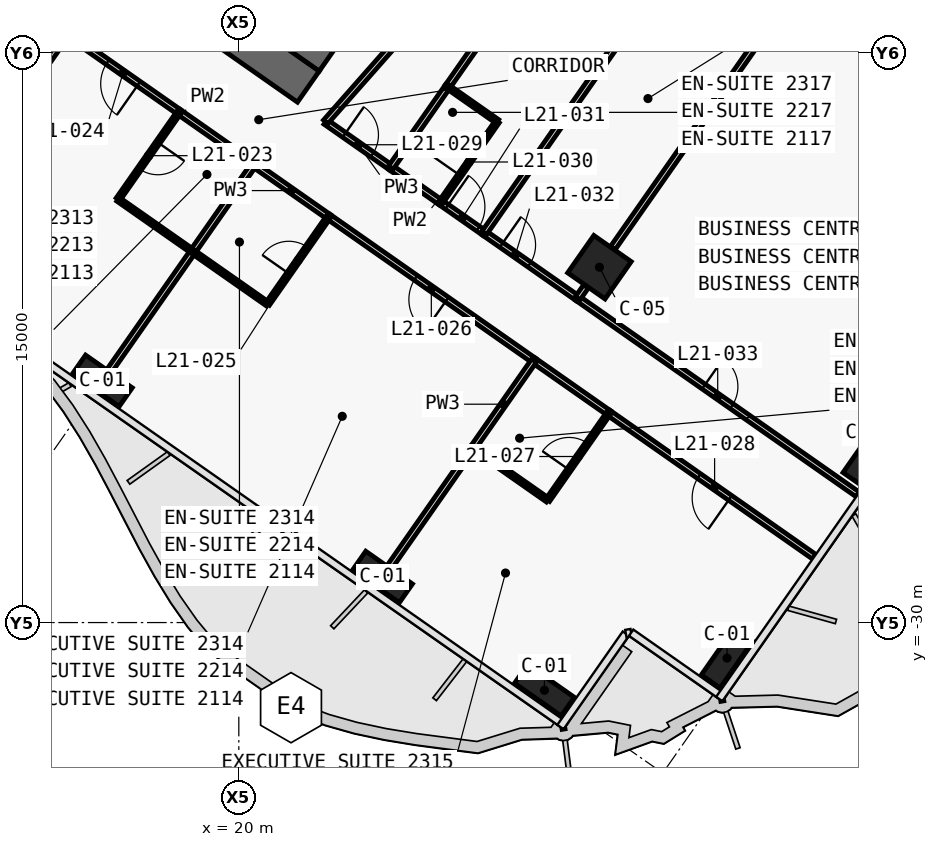
"""IFC4 building model, lengths in metres.
Left out: names, types, materials, properties, quantities, classifications, styles, units other than length and angle.
Written with IfcOpenShell. Run it as: python <this file> out.ifc"""

import sys

from ifc_helpers import new_model, si_unit, direction, frame, frame_2d, origin, origin_2d, place, context, subcontext, project, spatial, polyline, rectangle, outline, extrude, element, fill, save


model = new_model("IFC4")
c1 = context("Model", 3, precision=1e-05, world=origin(), true_north=direction((0.0, 1.0)))
c2 = subcontext(c1, "Body", "Model", "MODEL_VIEW")
j1 = project(units=[si_unit("LENGTHUNIT", "METRE"), si_unit("PLANEANGLEUNIT", "RADIAN")], contexts=[c1])
p1 = place(None, origin())
s1 = spatial("IfcSite", under=j1, at=p1, CompositionType="ELEMENT")
p2 = place(p1, origin())
s2 = spatial("IfcBuilding", under=s1, at=p2, CompositionType="ELEMENT")
p3 = place(p2, frame((0.0, 0.0, 101.3)))
s3 = spatial("IfcBuildingStorey", under=s2, at=p3, CompositionType="ELEMENT", Elevation=101.3)
p4 = place(p3, frame((-0.037, -0.585, 0.0), z_axis=(0.0, 0.0, 1.0), x_axis=(0.819157152511, -0.573569140985, 0.0)))
e1 = element("IfcWall", 1, at=p4, inside=s3, PredefinedType="SHEAR", context=c2, shape_type="SweptSolid", body=[
    extrude(outline(polyline([(26.695, 0.5), (0.0, 0.5), (0.7, -0.5), (26.695, -0.5), (26.695, 0.5)])), origin(), (0.0, 0.0, 1.0), 3.6),
])
p5 = place(p4, frame((1.045, 0.0, 0.0)))
e2 = element("IfcOpeningElement", 2, at=p5, cuts=e1, PredefinedType="OPENING", context=c2, shape_type="SweptSolid", body=[
    extrude(rectangle(XDim=1.5, YDim=2.1, at=frame_2d((0.75, 1.05))), frame((0.0, 0.51, 0.0), z_axis=(0.0, -1.0, 0.0), x_axis=(1.0, 0.0, 0.0)), (0.0, 0.0, 1.0), 1.02),
])
p6 = place(p4, frame((12.445, 0.0, 0.0)))
e3 = element("IfcOpeningElement", 3, at=p6, cuts=e1, PredefinedType="OPENING", context=c2, shape_type="SweptSolid", body=[
    extrude(rectangle(XDim=1.5, YDim=2.1, at=frame_2d((0.75, 1.05))), frame((0.0, 0.51, 0.0), z_axis=(0.0, -1.0, 0.0), x_axis=(1.0, 0.0, 0.0)), (0.0, 0.0, 1.0), 1.02),
])
p7 = place(p3, frame((21.708, -15.2, 0.0), z_axis=(0.0, 0.0, 1.0), x_axis=(0.573576324356, 0.819152122709, 0.0)))
e4 = element("IfcWall", 4, at=p7, inside=s3, PredefinedType="SHEAR", context=c2, shape_type="SweptSolid", body=[
    extrude(outline(polyline([(9.2, 0.5), (0.0, 0.5), (0.0, -0.5), (9.2, -0.5), (9.2, 0.5)])), origin(), (0.0, 0.0, 1.0), 3.6),
])
p8 = place(p7, frame((6.1, 0.0, 0.0)))
e5 = element("IfcOpeningElement", 5, at=p8, cuts=e4, PredefinedType="OPENING", context=c2, shape_type="SweptSolid", body=[
    extrude(rectangle(XDim=1.8, YDim=2.1, at=frame_2d((0.9, 1.05))), frame((0.0, 0.51, 0.0), z_axis=(0.0, -1.0, 0.0), x_axis=(1.0, 0.0, 0.0)), (0.0, 0.0, 1.0), 1.02),
])
p9 = place(p7, frame((1.9, 0.0, 0.0)))
e6 = element("IfcOpeningElement", 6, at=p9, cuts=e4, PredefinedType="OPENING", context=c2, shape_type="SweptSolid", body=[
    extrude(rectangle(XDim=1.8, YDim=2.1, at=frame_2d((0.9, 1.05))), frame((0.0, 0.51, 0.0), z_axis=(0.0, -1.0, 0.0), x_axis=(1.0, 0.0, 0.0)), (0.0, 0.0, 1.0), 1.02),
])
for number, where, z_axis, x_axis in (
    (7, (16.41, -23.637, 0.0), (0.0, 0.0, 1.0), (0.819, -0.574, 0.0)),
    (8, (23.782, -28.799, 0.0), (0.0, 0.0, 1.0), (0.819, -0.574, 0.0)),
    (9, (28.042, -31.782, 0.0), (0.0, 0.0, 1.0), (0.819, -0.574, 0.0)),
    (10, (32.847, -30.935, 0.0), (0.0, 0.0, 1.0), (0.574, 0.819, 0.0)),
    (11, (36.575, -25.61, 0.0), (0.0, 0.0, 1.0), (0.574, 0.819, 0.0)),
):
    element("IfcColumn", number, at=place(p3, frame(where, z_axis=z_axis, x_axis=x_axis)), inside=s3, PredefinedType="COLUMN", context=c2, shape_type="SweptSolid", body=[
        extrude(rectangle(XDim=1.5, YDim=0.6, at=origin_2d()), origin(), (0.0, 0.0, 1.0), 3.6),
    ])
p10 = place(p3, frame((29.49, -20.649, 0.0), z_axis=(0.0, 0.0, 1.0), x_axis=(0.819152044289, -0.573576436351, 0.0)))
e12 = element("IfcColumn", 12, at=p10, inside=s3, PredefinedType="COLUMN", context=c2, shape_type="SweptSolid", body=[
    extrude(rectangle(XDim=1.2, YDim=1.2, at=origin_2d()), origin(), (0.0, 0.0, 1.0), 3.6),
])
p11 = place(p3, frame((22.284, -16.824, 0.0), z_axis=(0.0, 0.0, 1.0), x_axis=(0.819160859995, -0.573563846013, 0.0)))
e13 = element("IfcWall", 13, at=p11, inside=s3, PredefinedType="PARTITIONING", context=c2, shape_type="SweptSolid", body=[
    extrude(rectangle(XDim=2.098, YDim=0.15, at=frame_2d((1.049, 0.0))), origin(), (0.0, 0.0, 1.0), 3.32),
])
p12 = place(p11, frame((0.599, 0.0, 0.0)))
e14 = element("IfcOpeningElement", 14, at=p12, cuts=e13, PredefinedType="OPENING", context=c2, shape_type="SweptSolid", body=[
    extrude(rectangle(XDim=0.9, YDim=2.1, at=frame_2d((0.45, 1.05))), frame((0.0, 0.085, 0.0), z_axis=(0.0, -1.0, 0.0), x_axis=(1.0, 0.0, 0.0)), (0.0, 0.0, 1.0), 0.17),
])
p13 = place(p3, frame((25.311, -18.944, 0.0), z_axis=(0.0, 0.0, 1.0), x_axis=(0.819199220913, -0.573509055252, 0.0)))
e15 = element("IfcWall", 15, at=p13, inside=s3, PredefinedType="PARTITIONING", context=c2, shape_type="SweptSolid", body=[
    extrude(rectangle(XDim=1.403, YDim=0.15, at=frame_2d((0.702, 0.0))), origin(), (0.0, 0.0, 1.0), 3.32),
])
p14 = place(p13, frame((0.201, 0.0, 0.0)))
e16 = element("IfcOpeningElement", 16, at=p14, cuts=e15, PredefinedType="OPENING", context=c2, shape_type="SweptSolid", body=[
    extrude(rectangle(XDim=1.0, YDim=2.1, at=frame_2d((0.5, 1.05))), frame((0.0, 0.085, 0.0), z_axis=(0.0, -1.0, 0.0), x_axis=(1.0, 0.0, 0.0)), (0.0, 0.0, 1.0), 0.17),
])
p15 = place(p3, frame((23.999, -18.025, 0.0), z_axis=(0.0, 0.0, 1.0), x_axis=(0.819189013667, -0.573523634986, 0.0)))
e17 = element("IfcWall", 17, at=p15, inside=s3, PredefinedType="PARTITIONING", context=c2, shape_type="SweptSolid", body=[
    extrude(rectangle(XDim=1.604, YDim=0.15, at=frame_2d((0.802, 0.0))), origin(), (0.0, 0.0, 1.0), 3.32),
])
p16 = place(p3, frame((26.457, -19.746, 0.0), z_axis=(0.0, 0.0, 1.0), x_axis=(0.81916700466, -0.573555070134, 0.0)))
e18 = element("IfcWall", 18, at=p16, inside=s3, PredefinedType="PARTITIONING", context=c2, shape_type="SweptSolid", body=[
    extrude(rectangle(XDim=3.004, YDim=0.15, at=frame_2d((1.502, 0.0))), origin(), (0.0, 0.0, 1.0), 2.6),
])
p17 = place(p16, frame((0.552, 0.0, 0.0)))
e19 = element("IfcOpeningElement", 19, at=p17, cuts=e18, PredefinedType="OPENING", context=c2, shape_type="SweptSolid", body=[
    extrude(rectangle(XDim=0.9, YDim=2.1, at=frame_2d((0.45, 1.05))), frame((0.0, 0.085, 0.0), z_axis=(0.0, -1.0, 0.0), x_axis=(1.0, 0.0, 0.0)), (0.0, 0.0, 1.0), 0.17),
])
p18 = place(p3, frame((28.914, -21.467, 0.0), z_axis=(0.0, 0.0, 1.0), x_axis=(0.81915291695, -0.57357519006, 0.0)))
e20 = element("IfcWall", 20, at=p18, inside=s3, PredefinedType="PARTITIONING", context=c2, shape_type="SweptSolid", body=[
    extrude(rectangle(XDim=9.002, YDim=0.15, at=frame_2d((4.501, 0.0))), origin(), (0.0, 0.0, 1.0), 2.5),
])
p19 = place(p18, frame((4.051, 0.0, 0.0)))
e21 = element("IfcOpeningElement", 21, at=p19, cuts=e20, PredefinedType="OPENING", context=c2, shape_type="SweptSolid", body=[
    extrude(rectangle(XDim=0.9, YDim=2.1, at=frame_2d((0.45, 1.05))), frame((0.0, 0.085, 0.0), z_axis=(0.0, -1.0, 0.0), x_axis=(1.0, 0.0, 0.0)), (0.0, 0.0, 1.0), 0.17),
])
p20 = place(p3, frame((18.431, -16.568, 0.0), z_axis=(0.0, 0.0, 1.0), x_axis=(-0.819145961204, 0.573585123798, 0.0)))
e22 = element("IfcWall", 22, at=p20, inside=s3, PredefinedType="PARTITIONING", context=c2, shape_type="SweptSolid", body=[
    extrude(rectangle(XDim=3.603, YDim=0.15, at=frame_2d((1.802, 0.0))), origin(), (0.0, 0.0, 1.0), 3.32),
])
p21 = place(p20, frame((1.301, 0.0, 0.0)))
e23 = element("IfcOpeningElement", 23, at=p21, cuts=e22, PredefinedType="OPENING", context=c2, shape_type="SweptSolid", body=[
    extrude(rectangle(XDim=1.0, YDim=2.1, at=frame_2d((0.5, 1.05))), frame((0.0, 0.085, 0.0), z_axis=(0.0, -1.0, 0.0), x_axis=(1.0, 0.0, 0.0)), (0.0, 0.0, 1.0), 0.17),
])
p22 = place(p3, frame((20.398, -17.945, 0.0), z_axis=(0.0, 0.0, 1.0), x_axis=(-0.819146032251, 0.573585022335, 0.0)))
e24 = element("IfcWall", 24, at=p22, inside=s3, PredefinedType="PARTITIONING", context=c2, shape_type="SweptSolid", body=[
    extrude(rectangle(XDim=2.404, YDim=0.15, at=frame_2d((1.202, 0.0))), origin(), (0.0, 0.0, 1.0), 2.6),
])
p23 = place(p3, frame((27.771, -23.107, 0.0), z_axis=(0.0, 0.0, 1.0), x_axis=(-0.819153746897, 0.573574004767, 0.0)))
e25 = element("IfcWall", 25, at=p23, inside=s3, PredefinedType="PARTITIONING", context=c2, shape_type="SweptSolid", body=[
    extrude(rectangle(XDim=6.603, YDim=0.15, at=frame_2d((3.302, 0.0))), origin(), (0.0, 0.0, 1.0), 2.6),
])
p24 = place(p23, frame((2.802, 0.0, 0.0)))
e26 = element("IfcOpeningElement", 26, at=p24, cuts=e25, PredefinedType="OPENING", context=c2, shape_type="SweptSolid", body=[
    extrude(rectangle(XDim=1.0, YDim=2.1, at=frame_2d((0.5, 1.05))), frame((0.0, 0.085, 0.0), z_axis=(0.0, -1.0, 0.0), x_axis=(1.0, 0.0, 0.0)), (0.0, 0.0, 1.0), 0.17),
])
p25 = place(p3, frame((22.364, -19.322, 0.0), z_axis=(0.0, 0.0, 1.0), x_axis=(-0.819146032251, 0.573585022335, 0.0)))
e27 = element("IfcWall", 27, at=p25, inside=s3, PredefinedType="PARTITIONING", context=c2, shape_type="SweptSolid", body=[
    extrude(rectangle(XDim=2.404, YDim=0.15, at=frame_2d((1.202, 0.0))), origin(), (0.0, 0.0, 1.0), 2.6),
])
p26 = place(p3, frame((35.141, -28.268, 0.0), z_axis=(0.0, 0.0, 1.0), x_axis=(-0.819155459934, 0.573571558274, 0.0)))
e28 = element("IfcWall", 28, at=p26, inside=s3, PredefinedType="PARTITIONING", context=c2, shape_type="SweptSolid", body=[
    extrude(rectangle(XDim=6.601, YDim=0.15, at=frame_2d((3.301, 0.0))), origin(), (0.0, 0.0, 1.0), 2.5),
])
p27 = place(p26, frame((2.7, 0.0, 0.0)))
e29 = element("IfcOpeningElement", 29, at=p27, cuts=e28, PredefinedType="OPENING", context=c2, shape_type="SweptSolid", body=[
    extrude(rectangle(XDim=1.0, YDim=2.1, at=frame_2d((0.5, 1.05))), frame((0.0, 0.085, 0.0), z_axis=(0.0, -1.0, 0.0), x_axis=(1.0, 0.0, 0.0)), (0.0, 0.0, 1.0), 0.17),
])
p28 = place(p3, frame((29.736, -24.484, 0.0), z_axis=(0.0, 0.0, 1.0), x_axis=(-0.819146032251, 0.573585022335, 0.0)))
e30 = element("IfcWall", 30, at=p28, inside=s3, PredefinedType="PARTITIONING", context=c2, shape_type="SweptSolid", body=[
    extrude(rectangle(XDim=2.404, YDim=0.15, at=frame_2d((1.202, 0.0))), origin(), (0.0, 0.0, 1.0), 2.6),
])
p29 = place(p3, frame((30.482, -8.77, 0.0), z_axis=(0.0, 0.0, 1.0), x_axis=(-0.573579093502, -0.819150183725, 0.0)))
e31 = element("IfcWall", 31, at=p29, inside=s3, PredefinedType="PARTITIONING", context=c2, shape_type="SweptSolid", body=[
    extrude(rectangle(XDim=8.701, YDim=0.15, at=frame_2d((4.351, 0.0))), origin(), (0.0, 0.0, 1.0), 2.6),
])
p30 = place(p3, frame((25.493, -15.895, 0.0), z_axis=(0.0, 0.0, 1.0), x_axis=(-0.573588285102, -0.819143747577, 0.0)))
e32 = element("IfcWall", 32, at=p30, inside=s3, PredefinedType="PARTITIONING", context=c2, shape_type="SweptSolid", body=[
    extrude(rectangle(XDim=2.602, YDim=0.15, at=frame_2d((1.301, 0.0))), origin(), (0.0, 0.0, 1.0), 2.6),
])
p31 = place(p3, frame((22.285, -16.825, 0.0), z_axis=(0.0, 0.0, 1.0), x_axis=(0.661551268245, 0.749899939647, 0.0)))
e33 = element("IfcWall", 33, at=p31, inside=s3, PredefinedType="PARTITIONING", context=c2, shape_type="SweptSolid", body=[
    extrude(rectangle(XDim=6.541, YDim=0.15, at=frame_2d((3.271, 0.0))), origin(), (0.0, 0.0, 1.0), 2.6),
])
p32 = place(p3, frame((25.312, -18.945, 0.0), z_axis=(0.0, 0.0, 1.0), x_axis=(0.573582085028, 0.819148089014, 0.0)))
e34 = element("IfcWall", 34, at=p32, inside=s3, PredefinedType="PARTITIONING", context=c2, shape_type="SweptSolid", body=[
    extrude(rectangle(XDim=2.6, YDim=0.12, at=frame_2d((1.3, 0.0))), origin(), (0.0, 0.0, 1.0), 2.6),
])
p33 = place(p32, frame((0.875, 0.0, 0.0)))
e35 = element("IfcOpeningElement", 35, at=p33, cuts=e34, PredefinedType="OPENING", context=c2, shape_type="SweptSolid", body=[
    extrude(rectangle(XDim=0.85, YDim=2.05, at=frame_2d((0.425, 1.025))), frame((0.0, 0.07, 0.0), z_axis=(0.0, -1.0, 0.0), x_axis=(1.0, 0.0, 0.0)), (0.0, 0.0, 1.0), 0.14),
])
p34 = place(p3, frame((26.803, -16.814, 0.0), z_axis=(0.0, 0.0, 1.0), x_axis=(-0.819059844958, 0.573708088123, 0.0)))
e36 = element("IfcWall", 36, at=p34, inside=s3, PredefinedType="PARTITIONING", context=c2, shape_type="SweptSolid", body=[
    extrude(rectangle(XDim=1.6, YDim=0.12, at=frame_2d((0.8, 0.0))), origin(), (0.0, 0.0, 1.0), 3.32),
])
p35 = place(p3, frame((32.94, -10.491, 0.0), z_axis=(0.0, 0.0, 1.0), x_axis=(-0.573571089604, -0.819155788095, 0.0)))
e37 = element("IfcWall", 37, at=p35, inside=s3, PredefinedType="PARTITIONING", context=c2, shape_type="SweptSolid", body=[
    extrude(rectangle(XDim=11.3, YDim=0.15, at=frame_2d((5.65, 0.0))), origin(), (0.0, 0.0, 1.0), 2.6),
])
p36 = place(p3, frame((35.013, -12.76, 0.0), z_axis=(0.0, 0.0, 1.0), x_axis=(-0.573558725113, -0.819164445546, 0.0)))
e38 = element("IfcWall", 38, at=p36, inside=s3, PredefinedType="PARTITIONING", context=c2, shape_type="SweptSolid", body=[
    extrude(rectangle(XDim=9.01, YDim=0.15, at=frame_2d((4.505, 0.0))), origin(), (0.0, 0.0, 1.0), 2.6),
])
p37 = place(p3, frame((29.134, -21.156, 0.0), z_axis=(0.0, 0.0, 1.0), x_axis=(-0.572944929411, -0.819593867633, 0.0)))
e39 = element("IfcWall", 39, at=p37, inside=s3, PredefinedType="PARTITIONING", context=c2, shape_type="SweptSolid", body=[
    extrude(rectangle(XDim=0.38, YDim=0.15, at=frame_2d((0.19, 0.0))), origin(), (0.0, 0.0, 1.0), 2.6),
])
p38 = place(p3, frame((15.481, -14.503, 0.0), z_axis=(0.0, 0.0, 1.0), x_axis=(-0.573572324301, -0.819154923562, 0.0)))
e40 = element("IfcWall", 40, at=p38, inside=s3, PredefinedType="PARTITIONING", context=c2, shape_type="SweptSolid", body=[
    extrude(rectangle(XDim=7.3, YDim=0.15, at=frame_2d((3.65, 0.0))), origin(), (0.0, 0.0, 1.0), 2.5),
])
p39 = place(p3, frame((18.43, -16.567, 0.0), z_axis=(0.0, 0.0, 1.0), x_axis=(-0.573608623498, -0.819129505664, 0.0)))
e41 = element("IfcWall", 41, at=p39, inside=s3, PredefinedType="PARTITIONING", context=c2, shape_type="SweptSolid", body=[
    extrude(rectangle(XDim=2.8, YDim=0.12, at=frame_2d((1.4, 0.0))), origin(), (0.0, 0.0, 1.0), 3.32),
])
p40 = place(p39, frame((0.975, 0.0, 0.0)))
e42 = element("IfcOpeningElement", 42, at=p40, cuts=e41, PredefinedType="OPENING", context=c2, shape_type="SweptSolid", body=[
    extrude(rectangle(XDim=0.85, YDim=2.05, at=frame_2d((0.425, 1.025))), frame((0.0, 0.07, 0.0), z_axis=(0.0, -1.0, 0.0), x_axis=(1.0, 0.0, 0.0)), (0.0, 0.0, 1.0), 0.14),
])
p41 = place(p3, frame((16.824, -18.862, 0.0), z_axis=(0.0, 0.0, 1.0), x_axis=(0.819141114317, -0.573592045652, 0.0)))
e43 = element("IfcWall", 43, at=p41, inside=s3, PredefinedType="PARTITIONING", context=c2, shape_type="SweptSolid", body=[
    extrude(rectangle(XDim=2.4, YDim=0.12, at=frame_2d((1.2, 0.0))), origin(), (0.0, 0.0, 1.0), 2.6),
])
p42 = place(p3, frame((18.79, -20.239, 0.0), z_axis=(0.0, 0.0, 1.0), x_axis=(-0.573594994199, -0.819139049631, 0.0)))
e44 = element("IfcWall", 44, at=p42, inside=s3, PredefinedType="PARTITIONING", context=c2, shape_type="SweptSolid", body=[
    extrude(rectangle(XDim=3.829, YDim=0.15, at=frame_2d((1.915, 0.0))), origin(), (0.0, 0.0, 1.0), 2.6),
])
p43 = place(p3, frame((20.396, -17.944, 0.0), z_axis=(0.0, 0.0, 1.0), x_axis=(-0.57364959175, -0.819100815459, 0.0)))
e45 = element("IfcWall", 45, at=p43, inside=s3, PredefinedType="PARTITIONING", context=c2, shape_type="SweptSolid", body=[
    extrude(rectangle(XDim=2.8, YDim=0.15, at=frame_2d((1.4, 0.0))), origin(), (0.0, 0.0, 1.0), 2.6),
])
p44 = place(p3, frame((18.79, -20.239, 0.0), z_axis=(0.0, 0.0, 1.0), x_axis=(0.819188907105, -0.573523787192, 0.0)))
e46 = element("IfcWall", 46, at=p44, inside=s3, PredefinedType="PARTITIONING", context=c2, shape_type="SweptSolid", body=[
    extrude(rectangle(XDim=2.4, YDim=0.12, at=frame_2d((1.2, 0.0))), origin(), (0.0, 0.0, 1.0), 2.6),
])
p45 = place(p3, frame((20.757, -21.615, 0.0), z_axis=(0.0, 0.0, 1.0), x_axis=(0.57364959175, 0.819100815459, 0.0)))
e47 = element("IfcWall", 47, at=p45, inside=s3, PredefinedType="PARTITIONING", context=c2, shape_type="SweptSolid", body=[
    extrude(rectangle(XDim=2.8, YDim=0.12, at=frame_2d((1.4, 0.0))), origin(), (0.0, 0.0, 1.0), 3.32),
])
p46 = place(p45, frame((0.975, 0.0, 0.0)))
e48 = element("IfcOpeningElement", 48, at=p46, cuts=e47, PredefinedType="OPENING", context=c2, shape_type="SweptSolid", body=[
    extrude(rectangle(XDim=0.85, YDim=2.05, at=frame_2d((0.425, 1.025))), frame((0.0, 0.07, 0.0), z_axis=(0.0, -1.0, 0.0), x_axis=(1.0, 0.0, 0.0)), (0.0, 0.0, 1.0), 0.14),
])
p47 = place(p3, frame((26.163, -25.399, 0.0), z_axis=(0.0, 0.0, 1.0), x_axis=(-0.57359919792, -0.819136105995, 0.0)))
e49 = element("IfcWall", 49, at=p47, inside=s3, PredefinedType="PARTITIONING", context=c2, shape_type="SweptSolid", body=[
    extrude(rectangle(XDim=3.831, YDim=0.15, at=frame_2d((1.916, 0.0))), origin(), (0.0, 0.0, 1.0), 2.6),
])
p48 = place(p3, frame((27.769, -23.106, 0.0), z_axis=(0.0, 0.0, 1.0), x_axis=(-0.573555899632, -0.819166423871, 0.0)))
e50 = element("IfcWall", 50, at=p48, inside=s3, PredefinedType="PARTITIONING", context=c2, shape_type="SweptSolid", body=[
    extrude(rectangle(XDim=2.802, YDim=0.15, at=frame_2d((1.401, 0.0))), origin(), (0.0, 0.0, 1.0), 2.6),
])
p49 = place(p3, frame((26.162, -25.401, 0.0), z_axis=(0.0, 0.0, 1.0), x_axis=(0.819188907105, -0.573523787192, 0.0)))
e51 = element("IfcWall", 51, at=p49, inside=s3, PredefinedType="PARTITIONING", context=c2, shape_type="SweptSolid", body=[
    extrude(rectangle(XDim=2.4, YDim=0.12, at=frame_2d((1.2, 0.0))), origin(), (0.0, 0.0, 1.0), 2.6),
])
p50 = place(p3, frame((28.129, -26.777, 0.0), z_axis=(0.0, 0.0, 1.0), x_axis=(0.573608623498, 0.819129505664, 0.0)))
e52 = element("IfcWall", 52, at=p50, inside=s3, PredefinedType="PARTITIONING", context=c2, shape_type="SweptSolid", body=[
    extrude(rectangle(XDim=2.8, YDim=0.12, at=frame_2d((1.4, 0.0))), origin(), (0.0, 0.0, 1.0), 3.32),
])
p51 = place(p50, frame((0.975, 0.0, 0.0)))
e53 = element("IfcOpeningElement", 53, at=p51, cuts=e52, PredefinedType="OPENING", context=c2, shape_type="SweptSolid", body=[
    extrude(rectangle(XDim=0.85, YDim=2.05, at=frame_2d((0.425, 1.025))), frame((0.0, 0.07, 0.0), z_axis=(0.0, -1.0, 0.0), x_axis=(1.0, 0.0, 0.0)), (0.0, 0.0, 1.0), 0.14),
])
p52 = place(p40, origin())
e54 = element("IfcDoor", 54, at=p52, inside=s3, OperationType="SINGLE_SWING_LEFT", PredefinedType="DOOR", context=c2, shape_type="SweptSolid", body=[
    extrude(rectangle(XDim=0.85, YDim=2.05, at=frame_2d((0.425, 1.025))), frame((0.0, 0.025, 0.0), z_axis=(0.0, -1.0, 0.0), x_axis=(1.0, 0.0, 0.0)), (0.0, 0.0, 1.0), 0.05),
])
fill(e42, e54)
p53 = place(p21, origin())
e55 = element("IfcDoor", 55, at=p53, inside=s3, OperationType="SINGLE_SWING_RIGHT", PredefinedType="DOOR", context=c2, shape_type="SweptSolid", body=[
    extrude(rectangle(XDim=1.0, YDim=2.1, at=frame_2d((0.5, 1.05))), frame((0.0, 0.025, 0.0), z_axis=(0.0, -1.0, 0.0), x_axis=(1.0, 0.0, 0.0)), (0.0, 0.0, 1.0), 0.05),
])
fill(e23, e55)
p54 = place(p46, origin())
e56 = element("IfcDoor", 56, at=p54, inside=s3, OperationType="SINGLE_SWING_LEFT", PredefinedType="DOOR", context=c2, shape_type="SweptSolid", body=[
    extrude(rectangle(XDim=0.85, YDim=2.05, at=frame_2d((0.425, 1.025))), frame((0.0, 0.025, 0.0), z_axis=(0.0, -1.0, 0.0), x_axis=(1.0, 0.0, 0.0)), (0.0, 0.0, 1.0), 0.05),
])
fill(e48, e56)
p55 = place(p24, origin())
e57 = element("IfcDoor", 57, at=p55, inside=s3, OperationType="SINGLE_SWING_LEFT", PredefinedType="DOOR", context=c2, shape_type="SweptSolid", body=[
    extrude(rectangle(XDim=1.0, YDim=2.1, at=frame_2d((0.5, 1.05))), frame((0.0, 0.025, 0.0), z_axis=(0.0, -1.0, 0.0), x_axis=(1.0, 0.0, 0.0)), (0.0, 0.0, 1.0), 0.05),
])
fill(e26, e57)
p56 = place(p51, origin())
e58 = element("IfcDoor", 58, at=p56, inside=s3, OperationType="SINGLE_SWING_LEFT", PredefinedType="DOOR", context=c2, shape_type="SweptSolid", body=[
    extrude(rectangle(XDim=0.85, YDim=2.05, at=frame_2d((0.425, 1.025))), frame((0.0, 0.025, 0.0), z_axis=(0.0, -1.0, 0.0), x_axis=(1.0, 0.0, 0.0)), (0.0, 0.0, 1.0), 0.05),
])
fill(e53, e58)
p57 = place(p27, origin())
e59 = element("IfcDoor", 59, at=p57, inside=s3, OperationType="SINGLE_SWING_RIGHT", PredefinedType="DOOR", context=c2, shape_type="SweptSolid", body=[
    extrude(rectangle(XDim=1.0, YDim=2.1, at=frame_2d((0.5, 1.05))), frame((0.0, 0.025, 0.0), z_axis=(0.0, -1.0, 0.0), x_axis=(1.0, 0.0, 0.0)), (0.0, 0.0, 1.0), 0.05),
])
fill(e29, e59)
p58 = place(p12, origin())
e60 = element("IfcDoor", 60, at=p58, inside=s3, OperationType="SINGLE_SWING_LEFT", PredefinedType="DOOR", context=c2, shape_type="SweptSolid", body=[
    extrude(rectangle(XDim=0.9, YDim=2.1, at=frame_2d((0.45, 1.05))), frame((0.0, 0.025, 0.0), z_axis=(0.0, -1.0, 0.0), x_axis=(1.0, 0.0, 0.0)), (0.0, 0.0, 1.0), 0.05),
])
fill(e14, e60)
p59 = place(p33, origin())
e61 = element("IfcDoor", 61, at=p59, inside=s3, OperationType="SINGLE_SWING_LEFT", PredefinedType="DOOR", context=c2, shape_type="SweptSolid", body=[
    extrude(rectangle(XDim=0.85, YDim=2.05, at=frame_2d((0.425, 1.025))), frame((0.0, 0.025, 0.0), z_axis=(0.0, -1.0, 0.0), x_axis=(1.0, 0.0, 0.0)), (0.0, 0.0, 1.0), 0.05),
])
fill(e35, e61)
p60 = place(p14, origin())
e62 = element("IfcDoor", 62, at=p60, inside=s3, OperationType="SINGLE_SWING_RIGHT", PredefinedType="DOOR", context=c2, shape_type="SweptSolid", body=[
    extrude(rectangle(XDim=1.0, YDim=2.1, at=frame_2d((0.5, 1.05))), frame((0.0, 0.025, 0.0), z_axis=(0.0, -1.0, 0.0), x_axis=(1.0, 0.0, 0.0)), (0.0, 0.0, 1.0), 0.05),
])
fill(e16, e62)
p61 = place(p17, origin())
e63 = element("IfcDoor", 63, at=p61, inside=s3, OperationType="SINGLE_SWING_RIGHT", PredefinedType="DOOR", context=c2, shape_type="SweptSolid", body=[
    extrude(rectangle(XDim=0.9, YDim=2.1, at=frame_2d((0.45, 1.05))), frame((0.0, 0.025, 0.0), z_axis=(0.0, -1.0, 0.0), x_axis=(1.0, 0.0, 0.0)), (0.0, 0.0, 1.0), 0.05),
])
fill(e19, e63)
p62 = place(p19, origin())
e64 = element("IfcDoor", 64, at=p62, inside=s3, OperationType="SINGLE_SWING_RIGHT", PredefinedType="DOOR", context=c2, shape_type="SweptSolid", body=[
    extrude(rectangle(XDim=0.9, YDim=2.1, at=frame_2d((0.45, 1.05))), frame((0.0, 0.025, 0.0), z_axis=(0.0, -1.0, 0.0), x_axis=(1.0, 0.0, 0.0)), (0.0, 0.0, 1.0), 0.05),
])
fill(e21, e64)
save(model, sys.argv[1])
